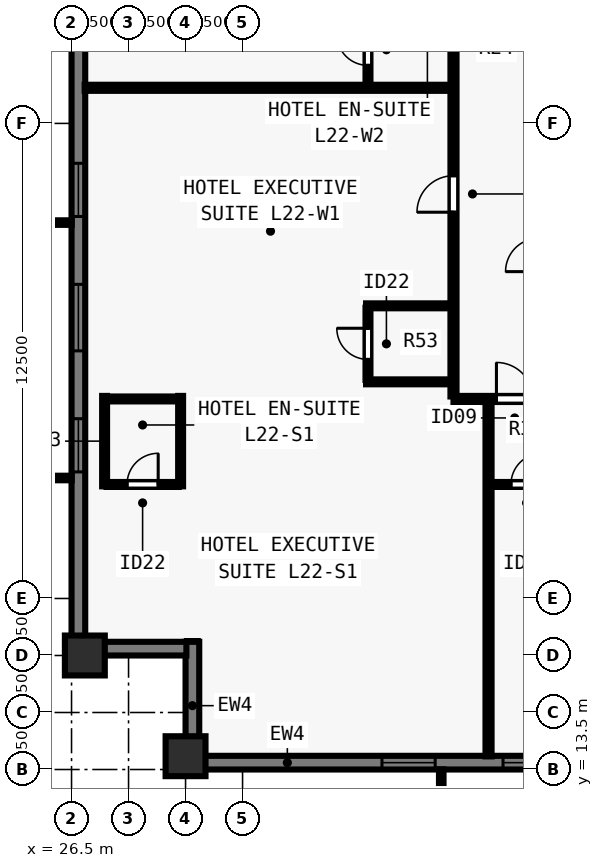
"""IFC4 building model, lengths in metres.
Left out: names, types, materials, properties, quantities, classifications, styles, units other than length and angle.
Written with IfcOpenShell. Run it as: python <this file> out.ifc"""

import sys

from ifc_helpers import new_model, si_unit, direction, frame, frame_2d, origin, origin_2d, place, context, subcontext, project, spatial, rectangle, extrude, element, fill, save


model = new_model("IFC4")
c1 = context("Model", 3, precision=1e-05, world=origin(), true_north=direction((0.0, 1.0)))
c2 = subcontext(c1, "Body", "Model", "MODEL_VIEW")
j1 = project(units=[si_unit("LENGTHUNIT", "METRE"), si_unit("PLANEANGLEUNIT", "RADIAN")], contexts=[c1])
p1 = place(None, origin())
s1 = spatial("IfcSite", under=j1, at=p1, CompositionType="ELEMENT")
p2 = place(p1, origin())
s2 = spatial("IfcBuilding", under=s1, at=p2, CompositionType="ELEMENT")
p3 = place(p2, frame((0.0, 0.0, 83.0)))
s3 = spatial("IfcBuildingStorey", under=s2, at=p3, CompositionType="ELEMENT", Elevation=83.0)
for number, where, z_axis, x_axis in (
    (1, (29.5, 13.85, 0.0), (0.0, 0.0, 1.0), (1.0, 0.0, 0.0)),
    (2, (26.85, 16.5, 0.0), (0.0, 0.0, 1.0), (0.0, 1.0, 0.0)),
):
    element("IfcColumn", number, at=place(p3, frame(where, z_axis=z_axis, x_axis=x_axis)), inside=s3, PredefinedType="COLUMN", context=c2, shape_type="SweptSolid", body=[
        extrude(rectangle(XDim=1.05, YDim=1.05, at=origin_2d()), origin(), (0.0, 0.0, 1.0), 3.5),
    ])
p4 = place(p3, frame((74.5, 13.68, 0.0), z_axis=(0.0, 0.0, 1.0), x_axis=(-1.0, 0.0, 0.0)))
e3 = element("IfcWall", 3, at=p4, inside=s3, PredefinedType="SOLIDWALL", context=c2, shape_type="SweptSolid", body=[
    extrude(rectangle(XDim=44.662, YDim=0.36, at=frame_2d((22.331, 0.0))), origin(), (0.0, 0.0, 1.0), 3.28),
])
p5 = place(p4, frame((4.83, 0.0, 0.8)))
e4 = element("IfcOpeningElement", 4, at=p5, cuts=e3, PredefinedType="OPENING", context=c2, shape_type="SweptSolid", body=[
    extrude(rectangle(XDim=1.4, YDim=1.544, at=frame_2d((0.7, 0.772))), frame((0.0, 0.19, 0.0), z_axis=(0.0, -1.0, 0.0), x_axis=(1.0, 0.0, 0.0)), (0.0, 0.0, 1.0), 0.38),
])
p6 = place(p4, frame((8.465, 0.0, 0.8)))
e5 = element("IfcOpeningElement", 5, at=p6, cuts=e3, PredefinedType="OPENING", context=c2, shape_type="SweptSolid", body=[
    extrude(rectangle(XDim=1.75, YDim=1.544, at=frame_2d((0.875, 0.772))), frame((0.0, 0.19, 0.0), z_axis=(0.0, -1.0, 0.0), x_axis=(1.0, 0.0, 0.0)), (0.0, 0.0, 1.0), 0.38),
])
p7 = place(p4, frame((11.551, 0.0, 0.8)))
e6 = element("IfcOpeningElement", 6, at=p7, cuts=e3, PredefinedType="OPENING", context=c2, shape_type="SweptSolid", body=[
    extrude(rectangle(XDim=1.4, YDim=1.544, at=frame_2d((0.7, 0.772))), frame((0.0, 0.19, 0.0), z_axis=(0.0, -1.0, 0.0), x_axis=(1.0, 0.0, 0.0)), (0.0, 0.0, 1.0), 0.38),
])
p8 = place(p4, frame((14.736, 0.0, 0.8)))
e7 = element("IfcOpeningElement", 7, at=p8, cuts=e3, PredefinedType="OPENING", context=c2, shape_type="SweptSolid", body=[
    extrude(rectangle(XDim=1.75, YDim=1.544, at=frame_2d((0.875, 0.772))), frame((0.0, 0.19, 0.0), z_axis=(0.0, -1.0, 0.0), x_axis=(1.0, 0.0, 0.0)), (0.0, 0.0, 1.0), 0.38),
])
p9 = place(p4, frame((18.721, 0.0, 0.8)))
e8 = element("IfcOpeningElement", 8, at=p9, cuts=e3, PredefinedType="OPENING", context=c2, shape_type="SweptSolid", body=[
    extrude(rectangle(XDim=1.4, YDim=1.544, at=frame_2d((0.7, 0.772))), frame((0.0, 0.19, 0.0), z_axis=(0.0, -1.0, 0.0), x_axis=(1.0, 0.0, 0.0)), (0.0, 0.0, 1.0), 0.38),
])
p10 = place(p4, frame((21.456, 0.0, 0.8)))
e9 = element("IfcOpeningElement", 9, at=p10, cuts=e3, PredefinedType="OPENING", context=c2, shape_type="SweptSolid", body=[
    extrude(rectangle(XDim=1.75, YDim=1.544, at=frame_2d((0.875, 0.772))), frame((0.0, 0.19, 0.0), z_axis=(0.0, -1.0, 0.0), x_axis=(1.0, 0.0, 0.0)), (0.0, 0.0, 1.0), 0.38),
])
p11 = place(p4, frame((24.991, 0.0, 0.8)))
e10 = element("IfcOpeningElement", 10, at=p11, cuts=e3, PredefinedType="OPENING", context=c2, shape_type="SweptSolid", body=[
    extrude(rectangle(XDim=1.4, YDim=1.544, at=frame_2d((0.7, 0.772))), frame((0.0, 0.19, 0.0), z_axis=(0.0, -1.0, 0.0), x_axis=(1.0, 0.0, 0.0)), (0.0, 0.0, 1.0), 0.38),
])
p12 = place(p4, frame((28.177, 0.0, 0.8)))
e11 = element("IfcOpeningElement", 11, at=p12, cuts=e3, PredefinedType="OPENING", context=c2, shape_type="SweptSolid", body=[
    extrude(rectangle(XDim=1.75, YDim=1.544, at=frame_2d((0.875, 0.772))), frame((0.0, 0.19, 0.0), z_axis=(0.0, -1.0, 0.0), x_axis=(1.0, 0.0, 0.0)), (0.0, 0.0, 1.0), 0.38),
])
p13 = place(p4, frame((31.711, 0.0, 0.8)))
e12 = element("IfcOpeningElement", 12, at=p13, cuts=e3, PredefinedType="OPENING", context=c2, shape_type="SweptSolid", body=[
    extrude(rectangle(XDim=1.4, YDim=1.544, at=frame_2d((0.7, 0.772))), frame((0.0, 0.19, 0.0), z_axis=(0.0, -1.0, 0.0), x_axis=(1.0, 0.0, 0.0)), (0.0, 0.0, 1.0), 0.38),
])
p14 = place(p4, frame((34.897, 0.0, 0.8)))
e13 = element("IfcOpeningElement", 13, at=p14, cuts=e3, PredefinedType="OPENING", context=c2, shape_type="SweptSolid", body=[
    extrude(rectangle(XDim=1.75, YDim=1.544, at=frame_2d((0.875, 0.772))), frame((0.0, 0.19, 0.0), z_axis=(0.0, -1.0, 0.0), x_axis=(1.0, 0.0, 0.0)), (0.0, 0.0, 1.0), 0.38),
])
p15 = place(p4, frame((38.432, 0.0, 0.8)))
e14 = element("IfcOpeningElement", 14, at=p15, cuts=e3, PredefinedType="OPENING", context=c2, shape_type="SweptSolid", body=[
    extrude(rectangle(XDim=1.4, YDim=1.544, at=frame_2d((0.7, 0.772))), frame((0.0, 0.19, 0.0), z_axis=(0.0, -1.0, 0.0), x_axis=(1.0, 0.0, 0.0)), (0.0, 0.0, 1.0), 0.38),
])
p16 = place(p3, frame((29.68, 13.5, 0.0), z_axis=(0.0, 0.0, 1.0), x_axis=(0.0, 1.0, 0.0)))
e15 = element("IfcWall", 15, at=p16, inside=s3, PredefinedType="SOLIDWALL", context=c2, shape_type="SweptSolid", body=[
    extrude(rectangle(XDim=3.36, YDim=0.36, at=frame_2d((1.68, 0.0))), origin(), (0.0, 0.0, 1.0), 3.28),
])
p17 = place(p3, frame((29.522, 16.68, 0.0), z_axis=(0.0, 0.0, 1.0), x_axis=(-1.0, 0.0, 0.0)))
e16 = element("IfcWall", 16, at=p17, inside=s3, PredefinedType="SOLIDWALL", context=c2, shape_type="SweptSolid", body=[
    extrude(rectangle(XDim=2.684, YDim=0.36, at=frame_2d((1.342, 0.0))), origin(), (0.0, 0.0, 1.0), 3.28),
])
p18 = place(p3, frame((26.68, 16.5, 0.0), z_axis=(0.0, 0.0, 1.0), x_axis=(0.0, 1.0, 0.0)))
e17 = element("IfcWall", 17, at=p18, inside=s3, PredefinedType="SOLIDWALL", context=c2, shape_type="SweptSolid", body=[
    extrude(rectangle(XDim=44.662, YDim=0.36, at=frame_2d((22.331, 0.0))), origin(), (0.0, 0.0, 1.0), 3.28),
])
p19 = place(p18, frame((4.83, 0.0, 0.8)))
e18 = element("IfcOpeningElement", 18, at=p19, cuts=e17, PredefinedType="OPENING", context=c2, shape_type="SweptSolid", body=[
    extrude(rectangle(XDim=1.4, YDim=1.544, at=frame_2d((0.7, 0.772))), frame((0.0, 0.19, 0.0), z_axis=(0.0, -1.0, 0.0), x_axis=(1.0, 0.0, 0.0)), (0.0, 0.0, 1.0), 0.38),
])
p20 = place(p18, frame((8.015, 0.0, 0.8)))
e19 = element("IfcOpeningElement", 19, at=p20, cuts=e17, PredefinedType="OPENING", context=c2, shape_type="SweptSolid", body=[
    extrude(rectangle(XDim=1.75, YDim=1.544, at=frame_2d((0.875, 0.772))), frame((0.0, 0.19, 0.0), z_axis=(0.0, -1.0, 0.0), x_axis=(1.0, 0.0, 0.0)), (0.0, 0.0, 1.0), 0.38),
])
p21 = place(p18, frame((11.551, 0.0, 0.8)))
e20 = element("IfcOpeningElement", 20, at=p21, cuts=e17, PredefinedType="OPENING", context=c2, shape_type="SweptSolid", body=[
    extrude(rectangle(XDim=1.4, YDim=1.544, at=frame_2d((0.7, 0.772))), frame((0.0, 0.19, 0.0), z_axis=(0.0, -1.0, 0.0), x_axis=(1.0, 0.0, 0.0)), (0.0, 0.0, 1.0), 0.38),
])
p22 = place(p18, frame((18.721, 0.0, 0.8)))
e21 = element("IfcOpeningElement", 21, at=p22, cuts=e17, PredefinedType="OPENING", context=c2, shape_type="SweptSolid", body=[
    extrude(rectangle(XDim=1.4, YDim=1.544, at=frame_2d((0.7, 0.772))), frame((0.0, 0.19, 0.0), z_axis=(0.0, -1.0, 0.0), x_axis=(1.0, 0.0, 0.0)), (0.0, 0.0, 1.0), 0.38),
])
p23 = place(p18, frame((22.706, 0.0, 0.8)))
e22 = element("IfcOpeningElement", 22, at=p23, cuts=e17, PredefinedType="OPENING", context=c2, shape_type="SweptSolid", body=[
    extrude(rectangle(XDim=1.75, YDim=1.544, at=frame_2d((0.875, 0.772))), frame((0.0, 0.19, 0.0), z_axis=(0.0, -1.0, 0.0), x_axis=(1.0, 0.0, 0.0)), (0.0, 0.0, 1.0), 0.38),
])
p24 = place(p18, frame((24.991, 0.0, 0.8)))
e23 = element("IfcOpeningElement", 23, at=p24, cuts=e17, PredefinedType="OPENING", context=c2, shape_type="SweptSolid", body=[
    extrude(rectangle(XDim=1.4, YDim=1.544, at=frame_2d((0.7, 0.772))), frame((0.0, 0.19, 0.0), z_axis=(0.0, -1.0, 0.0), x_axis=(1.0, 0.0, 0.0)), (0.0, 0.0, 1.0), 0.38),
])
p25 = place(p18, frame((28.177, 0.0, 0.8)))
e24 = element("IfcOpeningElement", 24, at=p25, cuts=e17, PredefinedType="OPENING", context=c2, shape_type="SweptSolid", body=[
    extrude(rectangle(XDim=1.75, YDim=1.544, at=frame_2d((0.875, 0.772))), frame((0.0, 0.19, 0.0), z_axis=(0.0, -1.0, 0.0), x_axis=(1.0, 0.0, 0.0)), (0.0, 0.0, 1.0), 0.38),
])
p26 = place(p18, frame((31.711, 0.0, 0.8)))
e25 = element("IfcOpeningElement", 25, at=p26, cuts=e17, PredefinedType="OPENING", context=c2, shape_type="SweptSolid", body=[
    extrude(rectangle(XDim=1.4, YDim=1.544, at=frame_2d((0.7, 0.772))), frame((0.0, 0.19, 0.0), z_axis=(0.0, -1.0, 0.0), x_axis=(1.0, 0.0, 0.0)), (0.0, 0.0, 1.0), 0.38),
])
p27 = place(p18, frame((34.897, 0.0, 0.8)))
e26 = element("IfcOpeningElement", 26, at=p27, cuts=e17, PredefinedType="OPENING", context=c2, shape_type="SweptSolid", body=[
    extrude(rectangle(XDim=1.75, YDim=1.544, at=frame_2d((0.875, 0.772))), frame((0.0, 0.19, 0.0), z_axis=(0.0, -1.0, 0.0), x_axis=(1.0, 0.0, 0.0)), (0.0, 0.0, 1.0), 0.38),
])
p28 = place(p3, frame((36.55, 23.25, 0.0), z_axis=(0.0, 0.0, 1.0), x_axis=(1.0, 0.0, 0.0)))
e27 = element("IfcWall", 27, at=p28, inside=s3, PredefinedType="PARTITIONING", context=c2, shape_type="SweptSolid", body=[
    extrude(rectangle(XDim=30.9, YDim=0.16, at=frame_2d((15.45, 0.0))), origin(), (0.0, 0.0, 1.0), 3.28),
])
p29 = place(p28, frame((1.13, 0.0, 0.0)))
e28 = element("IfcOpeningElement", 28, at=p29, cuts=e27, PredefinedType="OPENING", context=c2, shape_type="SweptSolid", body=[
    extrude(rectangle(XDim=0.96, YDim=2.15, at=frame_2d((0.48, 1.075))), frame((0.0, 0.09, 0.0), z_axis=(0.0, -1.0, 0.0), x_axis=(1.0, 0.0, 0.0)), (0.0, 0.0, 1.0), 0.18),
])
p30 = place(p28, frame((6.093, 0.0, 0.0)))
e29 = element("IfcOpeningElement", 29, at=p30, cuts=e27, PredefinedType="OPENING", context=c2, shape_type="SweptSolid", body=[
    extrude(rectangle(XDim=0.96, YDim=2.15, at=frame_2d((0.48, 1.075))), frame((0.0, 0.09, 0.0), z_axis=(0.0, -1.0, 0.0), x_axis=(1.0, 0.0, 0.0)), (0.0, 0.0, 1.0), 0.18),
])
p31 = place(p28, frame((16.125, 0.0, 0.0)))
e30 = element("IfcOpeningElement", 30, at=p31, cuts=e27, PredefinedType="OPENING", context=c2, shape_type="SweptSolid", body=[
    extrude(rectangle(XDim=0.96, YDim=2.15, at=frame_2d((0.48, 1.075))), frame((0.0, 0.09, 0.0), z_axis=(0.0, -1.0, 0.0), x_axis=(1.0, 0.0, 0.0)), (0.0, 0.0, 1.0), 0.18),
])
p32 = place(p28, frame((26.157, 0.0, 0.0)))
e31 = element("IfcOpeningElement", 31, at=p32, cuts=e27, PredefinedType="OPENING", context=c2, shape_type="SweptSolid", body=[
    extrude(rectangle(XDim=0.96, YDim=2.15, at=frame_2d((0.48, 1.075))), frame((0.0, 0.09, 0.0), z_axis=(0.0, -1.0, 0.0), x_axis=(1.0, 0.0, 0.0)), (0.0, 0.0, 1.0), 0.18),
])
p33 = place(p28, frame((28.92, 0.0, 0.0)))
e32 = element("IfcOpeningElement", 32, at=p33, cuts=e27, PredefinedType="OPENING", context=c2, shape_type="SweptSolid", body=[
    extrude(rectangle(XDim=0.96, YDim=2.15, at=frame_2d((0.48, 1.075))), frame((0.0, 0.09, 0.0), z_axis=(0.0, -1.0, 0.0), x_axis=(1.0, 0.0, 0.0)), (0.0, 0.0, 1.0), 0.18),
])
p34 = place(p3, frame((36.55, 23.315, 0.0), z_axis=(0.0, 0.0, 1.0), x_axis=(0.0, 1.0, 0.0)))
e33 = element("IfcWall", 33, at=p34, inside=s3, PredefinedType="PARTITIONING", context=c2, shape_type="SweptSolid", body=[
    extrude(rectangle(XDim=31.37, YDim=0.16, at=frame_2d((15.685, 0.0))), origin(), (0.0, 0.0, 1.0), 3.28),
])
p35 = place(p34, frame((4.848, 0.0, 0.0)))
e34 = element("IfcOpeningElement", 34, at=p35, cuts=e33, PredefinedType="OPENING", context=c2, shape_type="SweptSolid", body=[
    extrude(rectangle(XDim=0.96, YDim=2.15, at=frame_2d((0.48, 1.075))), frame((0.0, 0.09, 0.0), z_axis=(0.0, -1.0, 0.0), x_axis=(1.0, 0.0, 0.0)), (0.0, 0.0, 1.0), 0.18),
])
p36 = place(p34, frame((12.39, 0.0, 0.0)))
e35 = element("IfcOpeningElement", 35, at=p36, cuts=e33, PredefinedType="OPENING", context=c2, shape_type="SweptSolid", body=[
    extrude(rectangle(XDim=0.96, YDim=2.15, at=frame_2d((0.48, 1.075))), frame((0.0, 0.09, 0.0), z_axis=(0.0, -1.0, 0.0), x_axis=(1.0, 0.0, 0.0)), (0.0, 0.0, 1.0), 0.18),
])
p37 = place(p34, frame((20.265, 0.0, 0.0)))
e36 = element("IfcOpeningElement", 36, at=p37, cuts=e33, PredefinedType="OPENING", context=c2, shape_type="SweptSolid", body=[
    extrude(rectangle(XDim=0.96, YDim=2.15, at=frame_2d((0.48, 1.075))), frame((0.0, 0.09, 0.0), z_axis=(0.0, -1.0, 0.0), x_axis=(1.0, 0.0, 0.0)), (0.0, 0.0, 1.0), 0.18),
])
p38 = place(p34, frame((28.223, 0.0, 0.0)))
e37 = element("IfcOpeningElement", 37, at=p38, cuts=e33, PredefinedType="OPENING", context=c2, shape_type="SweptSolid", body=[
    extrude(rectangle(XDim=0.96, YDim=2.15, at=frame_2d((0.48, 1.075))), frame((0.0, 0.09, 0.0), z_axis=(0.0, -1.0, 0.0), x_axis=(1.0, 0.0, 0.0)), (0.0, 0.0, 1.0), 0.18),
])
for number, where, z_axis, x_axis in (
    (38, (27.37, 20.95, 0.0), (0.0, 0.0, 1.0), (0.0, 1.0, 0.0)),
    (39, (29.37, 20.95, 0.0), (0.0, 0.0, 1.0), (0.0, 1.0, 0.0)),
):
    element("IfcWall", number, at=place(p3, frame(where, z_axis=z_axis, x_axis=x_axis)), inside=s3, PredefinedType="PLUMBINGWALL", context=c2, shape_type="SweptSolid", body=[
        extrude(rectangle(XDim=2.38, YDim=0.13, at=frame_2d((1.19, 0.0))), origin(), (0.0, 0.0, 1.0), 3.28),
    ])
p39 = place(p3, frame((27.42, 21.0, 0.0), z_axis=(0.0, 0.0, 1.0), x_axis=(1.0, 0.0, 0.0)))
e40 = element("IfcWall", 40, at=p39, inside=s3, PredefinedType="PLUMBINGWALL", context=c2, shape_type="SweptSolid", body=[
    extrude(rectangle(XDim=1.9, YDim=0.13, at=frame_2d((0.95, 0.0))), origin(), (0.0, 0.0, 1.0), 3.28),
])
p40 = place(p39, frame((0.54, 0.0, 0.0)))
e41 = element("IfcOpeningElement", 41, at=p40, cuts=e40, PredefinedType="OPENING", context=c2, shape_type="SweptSolid", body=[
    extrude(rectangle(XDim=0.82, YDim=2.1, at=frame_2d((0.41, 1.05))), frame((0.0, 0.075, 0.0), z_axis=(0.0, -1.0, 0.0), x_axis=(1.0, 0.0, 0.0)), (0.0, 0.0, 1.0), 0.15),
])
p41 = place(p3, frame((27.42, 23.25, 0.0), z_axis=(0.0, 0.0, 1.0), x_axis=(1.0, 0.0, 0.0)))
e42 = element("IfcWall", 42, at=p41, inside=s3, PredefinedType="PLUMBINGWALL", context=c2, shape_type="SweptSolid", body=[
    extrude(rectangle(XDim=1.9, YDim=0.13, at=frame_2d((0.95, 0.0))), origin(), (0.0, 0.0, 1.0), 3.28),
])
p42 = place(p3, frame((37.472, 13.845, 0.0), z_axis=(0.0, 0.0, 1.0), x_axis=(0.0, 1.0, 0.0)))
e43 = element("IfcWall", 43, at=p42, inside=s3, PredefinedType="PARTITIONING", context=c2, shape_type="SweptSolid", body=[
    extrude(rectangle(XDim=9.34, YDim=0.16, at=frame_2d((4.67, 0.0))), origin(), (0.0, 0.0, 1.0), 3.28),
])
p43 = place(p3, frame((37.537, 21.0, 0.0), z_axis=(0.0, 0.0, 1.0), x_axis=(1.0, 0.0, 0.0)))
e44 = element("IfcWall", 44, at=p43, inside=s3, PredefinedType="PLUMBINGWALL", context=c2, shape_type="SweptSolid", body=[
    extrude(rectangle(XDim=1.885, YDim=0.13, at=frame_2d((0.942, 0.0))), origin(), (0.0, 0.0, 1.0), 3.28),
])
p44 = place(p43, frame((0.525, 0.0, 0.0)))
e45 = element("IfcOpeningElement", 45, at=p44, cuts=e44, PredefinedType="OPENING", context=c2, shape_type="SweptSolid", body=[
    extrude(rectangle(XDim=0.82, YDim=2.1, at=frame_2d((0.41, 1.05))), frame((0.0, 0.075, 0.0), z_axis=(0.0, -1.0, 0.0), x_axis=(1.0, 0.0, 0.0)), (0.0, 0.0, 1.0), 0.15),
])
p45 = place(p3, frame((34.25, 23.7, 0.0), z_axis=(0.0, 0.0, 1.0), x_axis=(1.0, 0.0, 0.0)))
e46 = element("IfcWall", 46, at=p45, inside=s3, PredefinedType="PLUMBINGWALL", context=c2, shape_type="SweptSolid", body=[
    extrude(rectangle(XDim=2.235, YDim=0.13, at=frame_2d((1.118, 0.0))), origin(), (0.0, 0.0, 1.0), 2.849),
])
p46 = place(p3, frame((34.25, 25.7, 0.0), z_axis=(0.0, 0.0, 1.0), x_axis=(1.0, 0.0, 0.0)))
e47 = element("IfcWall", 47, at=p46, inside=s3, PredefinedType="PLUMBINGWALL", context=c2, shape_type="SweptSolid", body=[
    extrude(rectangle(XDim=2.235, YDim=0.13, at=frame_2d((1.118, 0.0))), origin(), (0.0, 0.0, 1.0), 3.28),
])
p47 = place(p3, frame((34.3, 23.75, 0.0), z_axis=(0.0, 0.0, 1.0), x_axis=(0.0, 1.0, 0.0)))
e48 = element("IfcWall", 48, at=p47, inside=s3, PredefinedType="PLUMBINGWALL", context=c2, shape_type="SweptSolid", body=[
    extrude(rectangle(XDim=1.9, YDim=0.13, at=frame_2d((0.95, 0.0))), origin(), (0.0, 0.0, 1.0), 3.28),
])
p48 = place(p47, frame((0.54, 0.0, 0.0)))
e49 = element("IfcOpeningElement", 49, at=p48, cuts=e48, PredefinedType="OPENING", context=c2, shape_type="SweptSolid", body=[
    extrude(rectangle(XDim=0.82, YDim=2.1, at=frame_2d((0.41, 1.05))), frame((0.0, 0.075, 0.0), z_axis=(0.0, -1.0, 0.0), x_axis=(1.0, 0.0, 0.0)), (0.0, 0.0, 1.0), 0.15),
])
p49 = place(p3, frame((26.845, 31.437, 0.0), z_axis=(0.0, 0.0, 1.0), x_axis=(1.0, 0.0, 0.0)))
e50 = element("IfcWall", 50, at=p49, inside=s3, PredefinedType="PARTITIONING", context=c2, shape_type="SweptSolid", body=[
    extrude(rectangle(XDim=9.64, YDim=0.16, at=frame_2d((4.82, 0.0))), origin(), (0.0, 0.0, 1.0), 3.28),
])
p50 = place(p3, frame((34.3, 31.502, 0.0), z_axis=(0.0, 0.0, 1.0), x_axis=(0.0, 1.0, 0.0)))
e51 = element("IfcWall", 51, at=p50, inside=s3, PredefinedType="PLUMBINGWALL", context=c2, shape_type="SweptSolid", body=[
    extrude(rectangle(XDim=1.885, YDim=0.13, at=frame_2d((0.942, 0.0))), origin(), (0.0, 0.0, 1.0), 3.28),
])
p51 = place(p50, frame((0.525, 0.0, 0.0)))
e52 = element("IfcOpeningElement", 52, at=p51, cuts=e51, PredefinedType="OPENING", context=c2, shape_type="SweptSolid", body=[
    extrude(rectangle(XDim=0.82, YDim=2.1, at=frame_2d((0.41, 1.05))), frame((0.0, 0.075, 0.0), z_axis=(0.0, -1.0, 0.0), x_axis=(1.0, 0.0, 0.0)), (0.0, 0.0, 1.0), 0.15),
])
p52 = place(p14, origin())
e53 = element("IfcWindow", 53, at=p52, inside=s3, PartitioningType="SINGLE_PANEL", PredefinedType="WINDOW", context=c2, shape_type="SweptSolid", body=[
    extrude(rectangle(XDim=1.75, YDim=1.544, at=frame_2d((0.875, 0.772))), frame((0.0, -0.05, 0.0), z_axis=(0.0, -1.0, 0.0), x_axis=(1.0, 0.0, 0.0)), (0.0, 0.0, 1.0), 0.06),
])
fill(e13, e53)
p53 = place(p15, origin())
e54 = element("IfcWindow", 54, at=p53, inside=s3, PartitioningType="SINGLE_PANEL", PredefinedType="WINDOW", context=c2, shape_type="SweptSolid", body=[
    extrude(rectangle(XDim=1.4, YDim=1.544, at=frame_2d((0.7, 0.772))), frame((0.0, -0.05, 0.0), z_axis=(0.0, -1.0, 0.0), x_axis=(1.0, 0.0, 0.0)), (0.0, 0.0, 1.0), 0.06),
])
fill(e14, e54)
p54 = place(p19, origin())
e55 = element("IfcWindow", 55, at=p54, inside=s3, PartitioningType="SINGLE_PANEL", PredefinedType="WINDOW", context=c2, shape_type="SweptSolid", body=[
    extrude(rectangle(XDim=1.4, YDim=1.544, at=frame_2d((0.7, 0.772))), frame((0.0, -0.05, 0.0), z_axis=(0.0, -1.0, 0.0), x_axis=(1.0, 0.0, 0.0)), (0.0, 0.0, 1.0), 0.06),
])
fill(e18, e55)
p55 = place(p20, origin())
e56 = element("IfcWindow", 56, at=p55, inside=s3, PartitioningType="SINGLE_PANEL", PredefinedType="WINDOW", context=c2, shape_type="SweptSolid", body=[
    extrude(rectangle(XDim=1.75, YDim=1.544, at=frame_2d((0.875, 0.772))), frame((0.0, -0.05, 0.0), z_axis=(0.0, -1.0, 0.0), x_axis=(1.0, 0.0, 0.0)), (0.0, 0.0, 1.0), 0.06),
])
fill(e19, e56)
p56 = place(p21, origin())
e57 = element("IfcWindow", 57, at=p56, inside=s3, PartitioningType="SINGLE_PANEL", PredefinedType="WINDOW", context=c2, shape_type="SweptSolid", body=[
    extrude(rectangle(XDim=1.4, YDim=1.544, at=frame_2d((0.7, 0.772))), frame((0.0, -0.05, 0.0), z_axis=(0.0, -1.0, 0.0), x_axis=(1.0, 0.0, 0.0)), (0.0, 0.0, 1.0), 0.06),
])
fill(e20, e57)
p57 = place(p40, origin())
e58 = element("IfcDoor", 58, at=p57, inside=s3, OperationType="SINGLE_SWING_RIGHT", PredefinedType="DOOR", context=c2, shape_type="SweptSolid", body=[
    extrude(rectangle(XDim=0.82, YDim=2.1, at=frame_2d((0.41, 1.05))), frame((0.0, 0.025, 0.0), z_axis=(0.0, -1.0, 0.0), x_axis=(1.0, 0.0, 0.0)), (0.0, 0.0, 1.0), 0.05),
])
fill(e41, e58)
p58 = place(p29, origin())
e59 = element("IfcDoor", 59, at=p58, inside=s3, OperationType="SINGLE_SWING_LEFT", PredefinedType="DOOR", context=c2, shape_type="SweptSolid", body=[
    extrude(rectangle(XDim=0.96, YDim=2.15, at=frame_2d((0.48, 1.075))), frame((0.0, 0.025, 0.0), z_axis=(0.0, -1.0, 0.0), x_axis=(1.0, 0.0, 0.0)), (0.0, 0.0, 1.0), 0.05),
])
fill(e28, e59)
p59 = place(p44, origin())
e60 = element("IfcDoor", 60, at=p59, inside=s3, OperationType="SINGLE_SWING_RIGHT", PredefinedType="DOOR", context=c2, shape_type="SweptSolid", body=[
    extrude(rectangle(XDim=0.82, YDim=2.1, at=frame_2d((0.41, 1.05))), frame((0.0, 0.025, 0.0), z_axis=(0.0, -1.0, 0.0), x_axis=(1.0, 0.0, 0.0)), (0.0, 0.0, 1.0), 0.05),
])
fill(e45, e60)
p60 = place(p48, origin())
e61 = element("IfcDoor", 61, at=p60, inside=s3, OperationType="SINGLE_SWING_RIGHT", PredefinedType="DOOR", context=c2, shape_type="SweptSolid", body=[
    extrude(rectangle(XDim=0.82, YDim=2.1, at=frame_2d((0.41, 1.05))), frame((0.0, 0.025, 0.0), z_axis=(0.0, -1.0, 0.0), x_axis=(1.0, 0.0, 0.0)), (0.0, 0.0, 1.0), 0.05),
])
fill(e49, e61)
p61 = place(p35, origin())
e62 = element("IfcDoor", 62, at=p61, inside=s3, OperationType="SINGLE_SWING_LEFT", PredefinedType="DOOR", context=c2, shape_type="SweptSolid", body=[
    extrude(rectangle(XDim=0.96, YDim=2.15, at=frame_2d((0.48, 1.075))), frame((0.0, 0.025, 0.0), z_axis=(0.0, -1.0, 0.0), x_axis=(1.0, 0.0, 0.0)), (0.0, 0.0, 1.0), 0.05),
])
fill(e34, e62)
p62 = place(p51, origin())
e63 = element("IfcDoor", 63, at=p62, inside=s3, OperationType="SINGLE_SWING_RIGHT", PredefinedType="DOOR", context=c2, shape_type="SweptSolid", body=[
    extrude(rectangle(XDim=0.82, YDim=2.1, at=frame_2d((0.41, 1.05))), frame((0.0, 0.025, 0.0), z_axis=(0.0, -1.0, 0.0), x_axis=(1.0, 0.0, 0.0)), (0.0, 0.0, 1.0), 0.05),
])
fill(e52, e63)
save(model, sys.argv[1])
